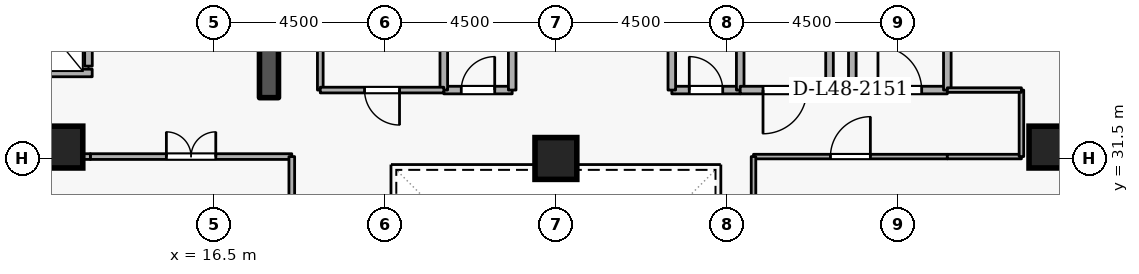
"""IFC4 building model, lengths in metres.
Left out: names, types, materials, properties, quantities, classifications, styles, units other than length and angle.
Written with IfcOpenShell. Run it as: python <this file> out.ifc"""

import sys

from ifc_helpers import new_model, si_unit, direction, frame, frame_2d, origin, origin_2d, place, context, subcontext, project, spatial, rectangle, extrude, element, fill, save


model = new_model("IFC4")
c1 = context("Model", 3, precision=1e-05, world=origin(), true_north=direction((0.0, 1.0)))
c2 = subcontext(c1, "Body", "Model", "MODEL_VIEW")
j1 = project(units=[si_unit("LENGTHUNIT", "METRE"), si_unit("PLANEANGLEUNIT", "RADIAN")], contexts=[c1])
p1 = place(None, origin())
s1 = spatial("IfcSite", under=j1, at=p1, CompositionType="ELEMENT")
p2 = place(p1, origin())
s2 = spatial("IfcBuilding", under=s1, at=p2, CompositionType="ELEMENT")
p3 = place(p2, frame((0.0, 0.0, 182.1)))
s3 = spatial("IfcBuildingStorey", under=s2, at=p3, CompositionType="ELEMENT", Elevation=182.1)
p4 = place(p3, frame((17.95, 33.1, 0.0), z_axis=(0.0, 0.0, 1.0), x_axis=(0.0, 1.0, 0.0)))
e1 = element("IfcWall", 1, at=p4, inside=s3, PredefinedType="SHEAR", context=c2, shape_type="SweptSolid", body=[
    extrude(rectangle(XDim=5.8, YDim=0.5, at=frame_2d((2.9, 0.0))), origin(), (0.0, 0.0, 1.0), 3.6),
])
for number, where, z_axis, x_axis in (
    (2, (12.5, 31.8, 0.0), (0.0, 0.0, 1.0), (1.0, 0.0, 0.0)),
    (3, (38.5, 31.8, 0.0), (0.0, 0.0, 1.0), (1.0, 0.0, 0.0)),
    (4, (25.5, 31.5, 0.0), (0.0, 0.0, 1.0), (1.0, 0.0, 0.0)),
):
    element("IfcColumn", number, at=place(p3, frame(where, z_axis=z_axis, x_axis=x_axis)), inside=s3, PredefinedType="COLUMN", context=c2, shape_type="SweptSolid", body=[
        extrude(rectangle(XDim=1.1, YDim=1.1, at=origin_2d()), origin(), (0.0, 0.0, 1.0), 3.6),
    ])
p5 = place(p3, frame((13.2, 33.93, 0.0), z_axis=(0.0, 0.0, 1.0), x_axis=(0.0, 1.0, 0.0)))
e5 = element("IfcWall", 5, at=p5, inside=s3, PredefinedType="STANDARD", context=c2, shape_type="SweptSolid", body=[
    extrude(rectangle(XDim=1.94, YDim=0.2, at=frame_2d((0.97, 0.0))), origin(), (0.0, 0.0, 1.0), 3.34),
])
p6 = place(p5, frame((0.46, 0.0, 0.0)))
e6 = element("IfcOpeningElement", 6, at=p6, cuts=e5, PredefinedType="OPENING", context=c2, shape_type="SweptSolid", body=[
    extrude(rectangle(XDim=1.02, YDim=2.06, at=frame_2d((0.51, 1.03))), frame((0.0, 0.11, 0.0), z_axis=(0.0, -1.0, 0.0), x_axis=(1.0, 0.0, 0.0)), (0.0, 0.0, 1.0), 0.22),
])
p7 = place(p3, frame((11.002, 33.75, 0.0), z_axis=(0.0, 0.0, 1.0), x_axis=(1.0, 0.0, 0.0)))
e7 = element("IfcWall", 7, at=p7, inside=s3, PredefinedType="STANDARD", context=c2, shape_type="SweptSolid", body=[
    extrude(rectangle(XDim=2.296, YDim=0.2, at=frame_2d((1.148, 0.0))), origin(), (0.0, 0.0, 1.0), 3.34),
])
p8 = place(p3, frame((33.3, 33.3, 0.0), z_axis=(0.0, 0.0, 1.0), x_axis=(1.0, 0.0, 0.0)))
e8 = element("IfcWall", 8, at=p8, inside=s3, PredefinedType="STANDARD", context=c2, shape_type="SweptSolid", body=[
    extrude(rectangle(XDim=2.5, YDim=0.2, at=frame_2d((1.25, 0.0))), origin(), (0.0, 0.0, 1.0), 3.34),
])
p9 = place(p8, frame((0.675, 0.0, 0.0)))
e9 = element("IfcOpeningElement", 9, at=p9, cuts=e8, PredefinedType="OPENING", context=c2, shape_type="SweptSolid", body=[
    extrude(rectangle(XDim=1.15, YDim=2.1, at=frame_2d((0.575, 1.05))), frame((0.0, 0.11, 0.0), z_axis=(0.0, -1.0, 0.0), x_axis=(1.0, 0.0, 0.0)), (0.0, 0.0, 1.0), 0.22),
])
p10 = place(p3, frame((35.8, 33.3, 0.0), z_axis=(0.0, 0.0, 1.0), x_axis=(0.0, 1.0, 0.0)))
e10 = element("IfcWall", 10, at=p10, inside=s3, PredefinedType="STANDARD", context=c2, shape_type="SweptSolid", body=[
    extrude(rectangle(XDim=5.7, YDim=0.2, at=frame_2d((2.85, 0.0))), origin(), (0.0, 0.0, 1.0), 3.34),
])
p11 = place(p3, frame((33.3, 35.6, 0.0), z_axis=(0.0, 0.0, 1.0), x_axis=(0.0, -1.0, 0.0)))
e11 = element("IfcWall", 11, at=p11, inside=s3, PredefinedType="STANDARD", context=c2, shape_type="SweptSolid", body=[
    extrude(rectangle(XDim=2.3, YDim=0.2, at=frame_2d((1.15, 0.0))), origin(), (0.0, 0.0, 1.0), 2.545),
])
p12 = place(p3, frame((22.55, 33.3, 0.0), z_axis=(0.0, 0.0, 1.0), x_axis=(1.0, 0.0, 0.0)))
e12 = element("IfcWall", 12, at=p12, inside=s3, PredefinedType="STANDARD", context=c2, shape_type="SweptSolid", body=[
    extrude(rectangle(XDim=1.8, YDim=0.2, at=frame_2d((0.9, 0.0))), origin(), (0.0, 0.0, 1.0), 3.34),
])
p13 = place(p12, frame((0.46, 0.0, 0.0)))
e13 = element("IfcOpeningElement", 13, at=p13, cuts=e12, PredefinedType="OPENING", context=c2, shape_type="SweptSolid", body=[
    extrude(rectangle(XDim=0.88, YDim=2.04, at=frame_2d((0.44, 1.02))), frame((0.0, 0.11, 0.0), z_axis=(0.0, -1.0, 0.0), x_axis=(1.0, 0.0, 0.0)), (0.0, 0.0, 1.0), 0.22),
])
for number, where, z_axis, x_axis in (
    (14, (24.35, 33.3, 0.0), (0.0, 0.0, 1.0), (0.0, 1.0, 0.0)),
    (15, (22.55, 35.35, 0.0), (0.0, 0.0, 1.0), (0.0, -1.0, 0.0)),
):
    element("IfcWall", number, at=place(p3, frame(where, z_axis=z_axis, x_axis=x_axis)), inside=s3, PredefinedType="STANDARD", context=c2, shape_type="SweptSolid", body=[
        extrude(rectangle(XDim=2.05, YDim=0.2, at=frame_2d((1.025, 0.0))), origin(), (0.0, 0.0, 1.0), 3.34),
    ])
p14 = place(p3, frame((28.55, 33.3, 0.0), z_axis=(0.0, 0.0, 1.0), x_axis=(1.0, 0.0, 0.0)))
e16 = element("IfcWall", 16, at=p14, inside=s3, PredefinedType="STANDARD", context=c2, shape_type="SweptSolid", body=[
    extrude(rectangle(XDim=1.8, YDim=0.2, at=frame_2d((0.9, 0.0))), origin(), (0.0, 0.0, 1.0), 3.34),
])
p15 = place(p14, frame((0.46, 0.0, 0.0)))
e17 = element("IfcOpeningElement", 17, at=p15, cuts=e16, PredefinedType="OPENING", context=c2, shape_type="SweptSolid", body=[
    extrude(rectangle(XDim=0.88, YDim=2.04, at=frame_2d((0.44, 1.02))), frame((0.0, 0.11, 0.0), z_axis=(0.0, -1.0, 0.0), x_axis=(1.0, 0.0, 0.0)), (0.0, 0.0, 1.0), 0.22),
])
for number, where, z_axis, x_axis in (
    (18, (30.35, 33.3, 0.0), (0.0, 0.0, 1.0), (0.0, 1.0, 0.0)),
    (19, (28.55, 35.35, 0.0), (0.0, 0.0, 1.0), (0.0, -1.0, 0.0)),
):
    element("IfcWall", number, at=place(p3, frame(where, z_axis=z_axis, x_axis=x_axis)), inside=s3, PredefinedType="STANDARD", context=c2, shape_type="SweptSolid", body=[
        extrude(rectangle(XDim=2.05, YDim=0.2, at=frame_2d((1.025, 0.0))), origin(), (0.0, 0.0, 1.0), 3.34),
    ])
p16 = place(p3, frame((32.7, 35.35, 0.0), z_axis=(0.0, 0.0, 1.0), x_axis=(0.0, -1.0, 0.0)))
e20 = element("IfcWall", 20, at=p16, inside=s3, PredefinedType="STANDARD", context=c2, shape_type="SweptSolid", body=[
    extrude(rectangle(XDim=2.05, YDim=0.2, at=frame_2d((1.025, 0.0))), origin(), (0.0, 0.0, 1.0), 2.545),
])
p17 = place(p3, frame((32.7, 33.3, 0.0), z_axis=(0.0, 0.0, 1.0), x_axis=(-1.0, 0.0, 0.0)))
e21 = element("IfcWall", 21, at=p17, inside=s3, PredefinedType="STANDARD", context=c2, shape_type="SweptSolid", body=[
    extrude(rectangle(XDim=2.35, YDim=0.2, at=frame_2d((1.175, 0.0))), origin(), (0.0, 0.0, 1.0), 3.34),
])
p18 = place(p17, frame((0.6, 0.0, 0.0)))
e22 = element("IfcOpeningElement", 22, at=p18, cuts=e21, PredefinedType="OPENING", context=c2, shape_type="SweptSolid", body=[
    extrude(rectangle(XDim=1.15, YDim=2.1, at=frame_2d((0.575, 1.05))), frame((0.0, 0.11, 0.0), z_axis=(0.0, -1.0, 0.0), x_axis=(1.0, 0.0, 0.0)), (0.0, 0.0, 1.0), 0.22),
])
p19 = place(p3, frame((19.3, 33.3, 0.0), z_axis=(0.0, 0.0, 1.0), x_axis=(0.0, 1.0, 0.0)))
e23 = element("IfcWall", 23, at=p19, inside=s3, PredefinedType="PARTITIONING", context=c2, shape_type="SweptSolid", body=[
    extrude(rectangle(XDim=2.05, YDim=0.15, at=frame_2d((1.025, 0.0))), origin(), (0.0, 0.0, 1.0), 3.34),
])
p20 = place(p3, frame((22.55, 33.3, 0.0), z_axis=(0.0, 0.0, 1.0), x_axis=(-1.0, 0.0, 0.0)))
e24 = element("IfcWall", 24, at=p20, inside=s3, PredefinedType="PARTITIONING", context=c2, shape_type="SweptSolid", body=[
    extrude(rectangle(XDim=3.25, YDim=0.15, at=frame_2d((1.625, 0.0))), origin(), (0.0, 0.0, 1.0), 3.34),
])
p21 = place(p20, frame((1.165, 0.0, 0.0)))
e25 = element("IfcOpeningElement", 25, at=p21, cuts=e24, PredefinedType="OPENING", context=c2, shape_type="SweptSolid", body=[
    extrude(rectangle(XDim=0.92, YDim=2.08, at=frame_2d((0.46, 1.04))), frame((0.0, 0.085, 0.0), z_axis=(0.0, -1.0, 0.0), x_axis=(1.0, 0.0, 0.0)), (0.0, 0.0, 1.0), 0.17),
])
p22 = place(p3, frame((13.25, 31.55, 0.0), z_axis=(0.0, 0.0, 1.0), x_axis=(1.0, 0.0, 0.0)))
e26 = element("IfcWall", 26, at=p22, inside=s3, PredefinedType="PARTITIONING", context=c2, shape_type="SweptSolid", body=[
    extrude(rectangle(XDim=5.3, YDim=0.15, at=frame_2d((2.65, 0.0))), origin(), (0.0, 0.0, 1.0), 3.34),
])
p23 = place(p22, frame((2.0, 0.0, 0.0)))
e27 = element("IfcOpeningElement", 27, at=p23, cuts=e26, PredefinedType="OPENING", context=c2, shape_type="SweptSolid", body=[
    extrude(rectangle(XDim=1.3, YDim=2.12, at=frame_2d((0.65, 1.06))), frame((0.0, 0.085, 0.0), z_axis=(0.0, -1.0, 0.0), x_axis=(1.0, 0.0, 0.0)), (0.0, 0.0, 1.0), 0.17),
])
p24 = place(p3, frame((18.55, 31.55, 0.0), z_axis=(0.0, 0.0, 1.0), x_axis=(0.0, -1.0, 0.0)))
e28 = element("IfcWall", 28, at=p24, inside=s3, PredefinedType="PARTITIONING", context=c2, shape_type="SweptSolid", body=[
    extrude(rectangle(XDim=4.55, YDim=0.15, at=frame_2d((2.275, 0.0))), origin(), (0.0, 0.0, 1.0), 3.34),
])
p25 = place(p3, frame((10.9, 31.55, 0.0), z_axis=(0.0, 0.0, 1.0), x_axis=(1.0, 0.0, 0.0)))
e29 = element("IfcWall", 29, at=p25, inside=s3, PredefinedType="PARTITIONING", context=c2, shape_type="SweptSolid", body=[
    extrude(rectangle(XDim=2.35, YDim=0.15, at=frame_2d((1.175, 0.0))), origin(), (0.0, 0.0, 1.0), 3.34),
])
p26 = place(p3, frame((30.7, 31.55, 0.0), z_axis=(0.0, 0.0, 1.0), x_axis=(1.0, 0.0, 0.0)))
e30 = element("IfcWall", 30, at=p26, inside=s3, PredefinedType="PARTITIONING", context=c2, shape_type="SweptSolid", body=[
    extrude(rectangle(XDim=5.1, YDim=0.12, at=frame_2d((2.55, 0.0))), origin(), (0.0, 0.0, 1.0), 3.34),
])
p27 = place(p26, frame((2.025, 0.0, 0.0)))
e31 = element("IfcOpeningElement", 31, at=p27, cuts=e30, PredefinedType="OPENING", context=c2, shape_type="SweptSolid", body=[
    extrude(rectangle(XDim=1.05, YDim=2.1, at=frame_2d((0.525, 1.05))), frame((0.0, 0.07, 0.0), z_axis=(0.0, -1.0, 0.0), x_axis=(1.0, 0.0, 0.0)), (0.0, 0.0, 1.0), 0.14),
])
p28 = place(p3, frame((35.8, 31.55, 0.0), z_axis=(0.0, 0.0, 1.0), x_axis=(1.0, 0.0, 0.0)))
e32 = element("IfcWall", 32, at=p28, inside=s3, PredefinedType="PARTITIONING", context=c2, shape_type="SweptSolid", body=[
    extrude(rectangle(XDim=1.95, YDim=0.12, at=frame_2d((0.975, 0.0))), origin(), (0.0, 0.0, 1.0), 3.34),
])
p29 = place(p3, frame((37.75, 31.55, 0.0), z_axis=(0.0, 0.0, 1.0), x_axis=(0.0, 1.0, 0.0)))
e33 = element("IfcWall", 33, at=p29, inside=s3, PredefinedType="PARTITIONING", context=c2, shape_type="SweptSolid", body=[
    extrude(rectangle(XDim=1.75, YDim=0.12, at=frame_2d((0.875, 0.0))), origin(), (0.0, 0.0, 1.0), 3.34),
])
p30 = place(p3, frame((37.75, 33.3, 0.0), z_axis=(0.0, 0.0, 1.0), x_axis=(-1.0, 0.0, 0.0)))
e34 = element("IfcWall", 34, at=p30, inside=s3, PredefinedType="PARTITIONING", context=c2, shape_type="SweptSolid", body=[
    extrude(rectangle(XDim=1.95, YDim=0.12, at=frame_2d((0.975, 0.0))), origin(), (0.0, 0.0, 1.0), 3.34),
])
p31 = place(p3, frame((30.7, 27.0, 0.0), z_axis=(0.0, 0.0, 1.0), x_axis=(0.0, 1.0, 0.0)))
e35 = element("IfcWall", 35, at=p31, inside=s3, PredefinedType="PARTITIONING", context=c2, shape_type="SweptSolid", body=[
    extrude(rectangle(XDim=4.55, YDim=0.12, at=frame_2d((2.275, 0.0))), origin(), (0.0, 0.0, 1.0), 3.34),
])
p32 = place(p9, origin())
e36 = element("IfcDoor", 36, at=p32, inside=s3, OperationType="SINGLE_SWING_LEFT", PredefinedType="DOOR", context=c2, shape_type="SweptSolid", body=[
    extrude(rectangle(XDim=1.15, YDim=2.1, at=frame_2d((0.575, 1.05))), frame((0.0, 0.025, 0.0), z_axis=(0.0, -1.0, 0.0), x_axis=(1.0, 0.0, 0.0)), (0.0, 0.0, 1.0), 0.05),
])
fill(e9, e36)
p33 = place(p13, origin())
e37 = element("IfcDoor", 37, at=p33, inside=s3, OperationType="SINGLE_SWING_RIGHT", PredefinedType="DOOR", context=c2, shape_type="SweptSolid", body=[
    extrude(rectangle(XDim=0.88, YDim=2.04, at=frame_2d((0.44, 1.02))), frame((0.0, 0.025, 0.0), z_axis=(0.0, -1.0, 0.0), x_axis=(1.0, 0.0, 0.0)), (0.0, 0.0, 1.0), 0.05),
])
fill(e13, e37)
p34 = place(p15, origin())
e38 = element("IfcDoor", 38, at=p34, inside=s3, OperationType="SINGLE_SWING_LEFT", PredefinedType="DOOR", context=c2, shape_type="SweptSolid", body=[
    extrude(rectangle(XDim=0.88, YDim=2.04, at=frame_2d((0.44, 1.02))), frame((0.0, 0.025, 0.0), z_axis=(0.0, -1.0, 0.0), x_axis=(1.0, 0.0, 0.0)), (0.0, 0.0, 1.0), 0.05),
])
fill(e17, e38)
p35 = place(p21, origin())
e39 = element("IfcDoor", 39, at=p35, inside=s3, OperationType="SINGLE_SWING_LEFT", PredefinedType="DOOR", context=c2, shape_type="SweptSolid", body=[
    extrude(rectangle(XDim=0.92, YDim=2.08, at=frame_2d((0.46, 1.04))), frame((0.0, 0.025, 0.0), z_axis=(0.0, -1.0, 0.0), x_axis=(1.0, 0.0, 0.0)), (0.0, 0.0, 1.0), 0.05),
])
fill(e25, e39)
p36 = place(p18, origin())
e40 = element("IfcDoor", 40, at=p36, inside=s3, OperationType="SINGLE_SWING_RIGHT", PredefinedType="DOOR", context=c2, shape_type="SweptSolid", body=[
    extrude(rectangle(XDim=1.15, YDim=2.1, at=frame_2d((0.575, 1.05))), frame((0.0, 0.025, 0.0), z_axis=(0.0, -1.0, 0.0), x_axis=(1.0, 0.0, 0.0)), (0.0, 0.0, 1.0), 0.05),
])
fill(e22, e40)
p37 = place(p23, origin())
e41 = element("IfcDoor", 41, at=p37, inside=s3, OperationType="DOUBLE_DOOR_SINGLE_SWING", PredefinedType="DOOR", context=c2, shape_type="SweptSolid", body=[
    extrude(rectangle(XDim=1.3, YDim=2.12, at=frame_2d((0.65, 1.06))), frame((0.0, 0.025, 0.0), z_axis=(0.0, -1.0, 0.0), x_axis=(1.0, 0.0, 0.0)), (0.0, 0.0, 1.0), 0.05),
])
fill(e27, e41)
p38 = place(p27, origin())
e42 = element("IfcDoor", 42, at=p38, inside=s3, OperationType="SINGLE_SWING_RIGHT", PredefinedType="DOOR", context=c2, shape_type="SweptSolid", body=[
    extrude(rectangle(XDim=1.05, YDim=2.1, at=frame_2d((0.525, 1.05))), frame((0.0, 0.025, 0.0), z_axis=(0.0, -1.0, 0.0), x_axis=(1.0, 0.0, 0.0)), (0.0, 0.0, 1.0), 0.05),
])
fill(e31, e42)
save(model, sys.argv[1])
